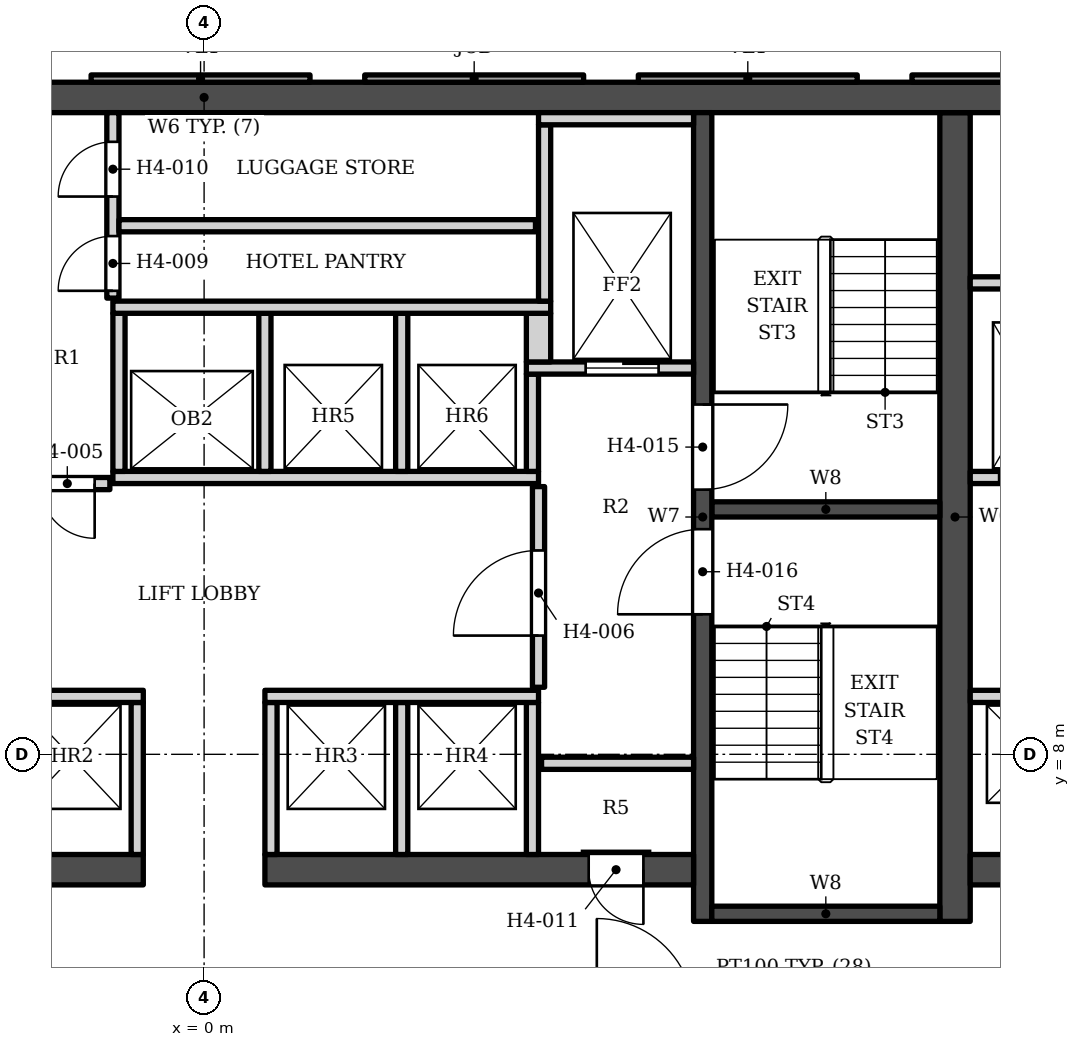
"""IFC4 building model, lengths in metres.
Left out: names, types, materials, properties, quantities, classifications, styles, units other than length and angle.
Written with IfcOpenShell. Run it as: python <this file> out.ifc"""

import sys

from ifc_helpers import new_model, si_unit, direction, frame, frame_2d, origin, place, context, subcontext, project, spatial, polyline, rectangle, outline, extrude, element, fill, save


model = new_model("IFC4")
c1 = context("Model", 3, precision=1e-05, world=origin(), true_north=direction((0.0, 1.0)))
c2 = subcontext(c1, "Body", "Model", "MODEL_VIEW")
j1 = project(units=[si_unit("LENGTHUNIT", "METRE"), si_unit("PLANEANGLEUNIT", "RADIAN")], contexts=[c1])
p1 = place(None, origin())
s1 = spatial("IfcSite", under=j1, at=p1, CompositionType="ELEMENT")
p2 = place(p1, origin())
s2 = spatial("IfcBuilding", under=s1, at=p2, CompositionType="ELEMENT")
p3 = place(p2, frame((0.0, 0.0, 76.6)))
s3 = spatial("IfcBuildingStorey", under=s2, at=p3, CompositionType="ELEMENT", Elevation=76.6)
p4 = place(p3, frame((-16.9, 18.802, 0.0), z_axis=(0.0, 0.0, 1.0), x_axis=(1.0, 0.0, 0.0)))
e1 = element("IfcWall", 1, at=p4, inside=s3, PredefinedType="SHEAR", context=c2, shape_type="SweptSolid", body=[
    extrude(rectangle(XDim=33.8, YDim=0.5, at=frame_2d((16.9, 0.0))), origin(), (0.0, 0.0, 1.0), 3.4),
])
p5 = place(p3, frame((12.35, 5.253, 0.0), z_axis=(0.0, 0.0, 1.0), x_axis=(0.0, 1.0, 0.0)))
e2 = element("IfcWall", 2, at=p5, inside=s3, PredefinedType="SHEAR", context=c2, shape_type="SweptSolid", body=[
    extrude(rectangle(XDim=13.3, YDim=0.5, at=frame_2d((6.65, 0.0))), origin(), (0.0, 0.0, 1.0), 3.4),
])
p6 = place(p3, frame((8.2, 5.253, 0.0), z_axis=(0.0, 0.0, 1.0), x_axis=(0.0, 1.0, 0.0)))
e3 = element("IfcWall", 3, at=p6, inside=s3, PredefinedType="SHEAR", context=c2, shape_type="SweptSolid", body=[
    extrude(rectangle(XDim=13.3, YDim=0.3, at=frame_2d((6.65, 0.0))), origin(), (0.0, 0.0, 1.0), 3.4),
])
p7 = place(p6, frame((7.1, 0.0, 0.0)))
e4 = element("IfcOpeningElement", 4, at=p7, cuts=e3, PredefinedType="OPENING", context=c2, shape_type="SweptSolid", body=[
    extrude(rectangle(XDim=1.4, YDim=2.1, at=frame_2d((0.7, 1.05))), frame((0.0, 0.16, 0.0), z_axis=(0.0, -1.0, 0.0), x_axis=(1.0, 0.0, 0.0)), (0.0, 0.0, 1.0), 0.32),
])
p8 = place(p6, frame((5.05, 0.0, 0.0)))
e5 = element("IfcOpeningElement", 5, at=p8, cuts=e3, PredefinedType="OPENING", context=c2, shape_type="SweptSolid", body=[
    extrude(rectangle(XDim=1.4, YDim=2.1, at=frame_2d((0.7, 1.05))), frame((0.0, 0.16, 0.0), z_axis=(0.0, -1.0, 0.0), x_axis=(1.0, 0.0, 0.0)), (0.0, 0.0, 1.0), 0.32),
])
for number, where, z_axis, x_axis in (
    (6, (8.35, 12.028, 0.0), (0.0, 0.0, 1.0), (1.0, 0.0, 0.0)),
    (7, (8.35, 5.378, 0.0), (0.0, 0.0, 1.0), (1.0, 0.0, 0.0)),
):
    element("IfcWall", number, at=place(p3, frame(where, z_axis=z_axis, x_axis=x_axis)), inside=s3, PredefinedType="SHEAR", context=c2, shape_type="SweptSolid", body=[
        extrude(rectangle(XDim=3.75, YDim=0.25, at=frame_2d((1.875, 0.0))), origin(), (0.0, 0.0, 1.0), 3.4),
    ])
p9 = place(p3, frame((-8.05, 6.103, 0.0), z_axis=(0.0, 0.0, 1.0), x_axis=(1.0, 0.0, 0.0)))
e8 = element("IfcWall", 8, at=p9, inside=s3, PredefinedType="SHEAR", context=c2, shape_type="SweptSolid", body=[
    extrude(rectangle(XDim=7.05, YDim=0.5, at=frame_2d((3.525, 0.0))), origin(), (0.0, 0.0, 1.0), 3.4),
])
p10 = place(p9, frame((0.825, 0.0, 0.0)))
e9 = element("IfcOpeningElement", 9, at=p10, cuts=e8, PredefinedType="OPENING", context=c2, shape_type="SweptSolid", body=[
    extrude(rectangle(XDim=0.9, YDim=2.1, at=frame_2d((0.45, 1.05))), frame((0.0, 0.26, 0.0), z_axis=(0.0, -1.0, 0.0), x_axis=(1.0, 0.0, 0.0)), (0.0, 0.0, 1.0), 0.52),
])
p11 = place(p3, frame((1.0, 6.103, 0.0), z_axis=(0.0, 0.0, 1.0), x_axis=(1.0, 0.0, 0.0)))
e10 = element("IfcWall", 10, at=p11, inside=s3, PredefinedType="SHEAR", context=c2, shape_type="SweptSolid", body=[
    extrude(rectangle(XDim=7.05, YDim=0.5, at=frame_2d((3.525, 0.0))), origin(), (0.0, 0.0, 1.0), 3.4),
])
p12 = place(p11, frame((5.325, 0.0, 0.0)))
e11 = element("IfcOpeningElement", 11, at=p12, cuts=e10, PredefinedType="OPENING", context=c2, shape_type="SweptSolid", body=[
    extrude(rectangle(XDim=0.9, YDim=2.1, at=frame_2d((0.45, 1.05))), frame((0.0, 0.26, 0.0), z_axis=(0.0, -1.0, 0.0), x_axis=(1.0, 0.0, 0.0)), (0.0, 0.0, 1.0), 0.52),
])
p13 = place(p3, frame((12.6, 6.103, 0.0), z_axis=(0.0, 0.0, 1.0), x_axis=(1.0, 0.0, 0.0)))
e12 = element("IfcWall", 12, at=p13, inside=s3, PredefinedType="SHEAR", context=c2, shape_type="SweptSolid", body=[
    extrude(rectangle(XDim=4.3, YDim=0.5, at=frame_2d((2.15, 0.0))), origin(), (0.0, 0.0, 1.0), 3.4),
])
p14 = place(p3, origin())
e13 = element("IfcWall", 13, at=p14, inside=s3, PredefinedType="SOLIDWALL", context=c2, shape_type="SweptSolid", body=[
    extrude(outline(polyline([(11.642, 19.173), (11.642, 19.052), (15.242, 19.052), (15.242, 19.173), (11.642, 19.173)])), origin(), (0.0, 0.0, 1.0), 2.65),
])
p15 = place(p3, origin())
e14 = element("IfcWall", 14, at=p15, inside=s3, PredefinedType="ELEMENTEDWALL", context=c2, shape_type="SweptSolid", body=[
    extrude(outline(polyline([(7.142, 19.173), (7.142, 19.052), (10.742, 19.052), (10.742, 19.173), (7.142, 19.173)])), origin(), (0.0, 0.0, 1.0), 2.65),
])
p16 = place(p3, origin())
e15 = element("IfcWall", 15, at=p16, inside=s3, PredefinedType="SOLIDWALL", context=c2, shape_type="SweptSolid", body=[
    extrude(outline(polyline([(2.642, 19.173), (2.642, 19.052), (6.242, 19.052), (6.242, 19.173), (2.642, 19.173)])), origin(), (0.0, 0.0, 1.0), 2.65),
])
p17 = place(p3, origin())
e16 = element("IfcWall", 16, at=p17, inside=s3, PredefinedType="ELEMENTEDWALL", context=c2, shape_type="SweptSolid", body=[
    extrude(outline(polyline([(-1.858, 19.173), (-1.858, 19.052), (1.742, 19.052), (1.742, 19.173), (-1.858, 19.173)])), origin(), (0.0, 0.0, 1.0), 2.65),
])
for number, where, z_axis, x_axis in (
    (17, (-1.1, 6.353, 0.0), (0.0, 0.0, 1.0), (0.0, 1.0, 0.0)),
    (18, (1.1, 6.353, 0.0), (0.0, 0.0, 1.0), (0.0, 1.0, 0.0)),
    (19, (3.25, 6.353, 0.0), (0.0, 0.0, 1.0), (0.0, 1.0, 0.0)),
    (20, (5.4, 6.353, 0.0), (0.0, 0.0, 1.0), (0.0, 1.0, 0.0)),
    (21, (5.55, 7.853, 0.0), (0.0, 0.0, 1.0), (1.0, 0.0, 0.0)),
):
    element("IfcWall", number, at=place(p3, frame(where, z_axis=z_axis, x_axis=x_axis)), inside=s3, PredefinedType="SOLIDWALL", context=c2, shape_type="SweptSolid", body=[
        extrude(rectangle(XDim=2.5, YDim=0.2, at=frame_2d((1.25, 0.0))), origin(), (0.0, 0.0, 1.0), 3.23),
    ])
for number, where, z_axis, x_axis in (
    (22, (-5.5, 8.953, 0.0), (0.0, 0.0, 1.0), (1.0, 0.0, 0.0)),
    (23, (1.0, 8.953, 0.0), (0.0, 0.0, 1.0), (1.0, 0.0, 0.0)),
):
    element("IfcWall", number, at=place(p3, frame(where, z_axis=z_axis, x_axis=x_axis)), inside=s3, PredefinedType="SOLIDWALL", context=c2, shape_type="SweptSolid", body=[
        extrude(rectangle(XDim=4.5, YDim=0.2, at=frame_2d((2.25, 0.0))), origin(), (0.0, 0.0, 1.0), 3.23),
    ])
p18 = place(p3, frame((12.6, 8.953, 0.0), z_axis=(0.0, 0.0, 1.0), x_axis=(1.0, 0.0, 0.0)))
e24 = element("IfcWall", 24, at=p18, inside=s3, PredefinedType="SOLIDWALL", context=c2, shape_type="SweptSolid", body=[
    extrude(rectangle(XDim=4.3, YDim=0.2, at=frame_2d((2.15, 0.0))), origin(), (0.0, 0.0, 1.0), 3.23),
])
p19 = place(p18, frame((0.525, 0.0, 0.0)))
e25 = element("IfcOpeningElement", 25, at=p19, cuts=e24, PredefinedType="OPENING", context=c2, shape_type="SweptSolid", body=[
    extrude(rectangle(XDim=1.1, YDim=2.1, at=frame_2d((0.55, 1.05))), frame((0.0, 0.11, 0.0), z_axis=(0.0, -1.0, 0.0), x_axis=(1.0, 0.0, 0.0)), (0.0, 0.0, 1.0), 0.22),
])
p20 = place(p18, frame((2.775, 0.0, 0.0)))
e26 = element("IfcOpeningElement", 26, at=p20, cuts=e24, PredefinedType="OPENING", context=c2, shape_type="SweptSolid", body=[
    extrude(rectangle(XDim=1.1, YDim=2.1, at=frame_2d((0.55, 1.05))), frame((0.0, 0.11, 0.0), z_axis=(0.0, -1.0, 0.0), x_axis=(1.0, 0.0, 0.0)), (0.0, 0.0, 1.0), 0.22),
])
p21 = place(p3, frame((5.5, 9.103, 0.0), z_axis=(0.0, 0.0, 1.0), x_axis=(0.0, 1.0, 0.0)))
e27 = element("IfcWall", 27, at=p21, inside=s3, PredefinedType="SOLIDWALL", context=c2, shape_type="SweptSolid", body=[
    extrude(rectangle(XDim=3.3, YDim=0.2, at=frame_2d((1.65, 0.0))), origin(), (0.0, 0.0, 1.0), 3.23),
])
p22 = place(p21, frame((0.85, 0.0, 0.0)))
e28 = element("IfcOpeningElement", 28, at=p22, cuts=e27, PredefinedType="OPENING", context=c2, shape_type="SweptSolid", body=[
    extrude(rectangle(XDim=1.4, YDim=2.1, at=frame_2d((0.7, 1.05))), frame((0.0, 0.11, 0.0), z_axis=(0.0, -1.0, 0.0), x_axis=(1.0, 0.0, 0.0)), (0.0, 0.0, 1.0), 0.22),
])
p23 = place(p3, frame((-2.95, 12.453, 0.0), z_axis=(0.0, 0.0, 1.0), x_axis=(1.0, 0.0, 0.0)))
e29 = element("IfcWall", 29, at=p23, inside=s3, PredefinedType="SOLIDWALL", context=c2, shape_type="SweptSolid", body=[
    extrude(rectangle(XDim=1.4, YDim=0.2, at=frame_2d((0.7, 0.0))), origin(), (0.0, 0.0, 1.0), 3.23),
])
p24 = place(p23, frame((0.25, 0.0, 0.0)))
e30 = element("IfcOpeningElement", 30, at=p24, cuts=e29, PredefinedType="OPENING", context=c2, shape_type="SweptSolid", body=[
    extrude(rectangle(XDim=0.9, YDim=2.1, at=frame_2d((0.45, 1.05))), frame((0.0, 0.11, 0.0), z_axis=(0.0, -1.0, 0.0), x_axis=(1.0, 0.0, 0.0)), (0.0, 0.0, 1.0), 0.22),
])
p25 = place(p3, frame((-1.5, 12.552, 0.0), z_axis=(0.0, 0.0, 1.0), x_axis=(1.0, 0.0, 0.0)))
e31 = element("IfcWall", 31, at=p25, inside=s3, PredefinedType="SOLIDWALL", context=c2, shape_type="SweptSolid", body=[
    extrude(rectangle(XDim=7.0, YDim=0.2, at=frame_2d((3.5, 0.0))), origin(), (0.0, 0.0, 1.0), 3.23),
])
p26 = place(p3, frame((12.6, 12.552, 0.0), z_axis=(0.0, 0.0, 1.0), x_axis=(1.0, 0.0, 0.0)))
e32 = element("IfcWall", 32, at=p26, inside=s3, PredefinedType="SOLIDWALL", context=c2, shape_type="SweptSolid", body=[
    extrude(rectangle(XDim=4.3, YDim=0.2, at=frame_2d((2.15, 0.0))), origin(), (0.0, 0.0, 1.0), 3.23),
])
p27 = place(p26, frame((0.475, 0.0, 0.0)))
e33 = element("IfcOpeningElement", 33, at=p27, cuts=e32, PredefinedType="OPENING", context=c2, shape_type="SweptSolid", body=[
    extrude(rectangle(XDim=1.2, YDim=2.1, at=frame_2d((0.6, 1.05))), frame((0.0, 0.11, 0.0), z_axis=(0.0, -1.0, 0.0), x_axis=(1.0, 0.0, 0.0)), (0.0, 0.0, 1.0), 0.22),
])
p28 = place(p26, frame((2.625, 0.0, 0.0)))
e34 = element("IfcOpeningElement", 34, at=p28, cuts=e32, PredefinedType="OPENING", context=c2, shape_type="SweptSolid", body=[
    extrude(rectangle(XDim=1.4, YDim=2.1, at=frame_2d((0.7, 1.05))), frame((0.0, 0.11, 0.0), z_axis=(0.0, -1.0, 0.0), x_axis=(1.0, 0.0, 0.0)), (0.0, 0.0, 1.0), 0.22),
])
for number, where, z_axis, x_axis in (
    (35, (-1.4, 12.653, 0.0), (0.0, 0.0, 1.0), (0.0, 1.0, 0.0)),
    (36, (1.0, 12.653, 0.0), (0.0, 0.0, 1.0), (0.0, 1.0, 0.0)),
    (37, (3.25, 12.653, 0.0), (0.0, 0.0, 1.0), (0.0, 1.0, 0.0)),
):
    element("IfcWall", number, at=place(p3, frame(where, z_axis=z_axis, x_axis=x_axis)), inside=s3, PredefinedType="SOLIDWALL", context=c2, shape_type="SweptSolid", body=[
        extrude(rectangle(XDim=2.6, YDim=0.2, at=frame_2d((1.3, 0.0))), origin(), (0.0, 0.0, 1.0), 3.23),
    ])
p29 = place(p3, frame((5.4, 12.653, 0.0), z_axis=(0.0, 0.0, 1.0), x_axis=(0.0, 1.0, 0.0)))
e38 = element("IfcWall", 38, at=p29, inside=s3, PredefinedType="SOLIDWALL", context=c2, shape_type="SweptSolid", body=[
    extrude(rectangle(XDim=1.6, YDim=0.2, at=frame_2d((0.8, 0.0))), origin(), (0.0, 0.0, 1.0), 3.23),
])
p30 = place(p3, frame((5.3, 14.353, 0.0), z_axis=(0.0, 0.0, 1.0), x_axis=(1.0, 0.0, 0.0)))
e39 = element("IfcWall", 39, at=p30, inside=s3, PredefinedType="SOLIDWALL", context=c2, shape_type="SweptSolid", body=[
    extrude(rectangle(XDim=2.75, YDim=0.2, at=frame_2d((1.375, 0.0))), origin(), (0.0, 0.0, 1.0), 3.23),
])
p31 = place(p30, frame((0.975, 0.0, 0.0)))
e40 = element("IfcOpeningElement", 40, at=p31, cuts=e39, PredefinedType="OPENING", context=c2, shape_type="SweptSolid", body=[
    extrude(rectangle(XDim=1.2, YDim=2.1, at=frame_2d((0.6, 1.05))), frame((0.0, 0.11, 0.0), z_axis=(0.0, -1.0, 0.0), x_axis=(1.0, 0.0, 0.0)), (0.0, 0.0, 1.0), 0.22),
])
p32 = place(p3, frame((5.5, 14.453, 0.0), z_axis=(0.0, 0.0, 1.0), x_axis=(0.0, 1.0, 0.0)))
e41 = element("IfcWall", 41, at=p32, inside=s3, PredefinedType="SOLIDWALL", context=c2, shape_type="SweptSolid", body=[
    extrude(rectangle(XDim=0.8, YDim=0.4, at=frame_2d((0.4, 0.0))), origin(), (0.0, 0.0, 1.0), 3.23),
])
p33 = place(p3, frame((-1.5, 15.353, 0.0), z_axis=(0.0, 0.0, 1.0), x_axis=(1.0, 0.0, 0.0)))
e42 = element("IfcWall", 42, at=p33, inside=s3, PredefinedType="SOLIDWALL", context=c2, shape_type="SweptSolid", body=[
    extrude(rectangle(XDim=7.2, YDim=0.2, at=frame_2d((3.6, 0.0))), origin(), (0.0, 0.0, 1.0), 3.23),
])
p34 = place(p3, frame((5.6, 15.453, 0.0), z_axis=(0.0, 0.0, 1.0), x_axis=(0.0, 1.0, 0.0)))
e43 = element("IfcWall", 43, at=p34, inside=s3, PredefinedType="SOLIDWALL", context=c2, shape_type="SweptSolid", body=[
    extrude(rectangle(XDim=2.9, YDim=0.2, at=frame_2d((1.45, 0.0))), origin(), (0.0, 0.0, 1.0), 3.23),
])
p35 = place(p3, frame((-1.5, 15.503, 0.0), z_axis=(0.0, 0.0, 1.0), x_axis=(0.0, 1.0, 0.0)))
e44 = element("IfcWall", 44, at=p35, inside=s3, PredefinedType="SOLIDWALL", context=c2, shape_type="SweptSolid", body=[
    extrude(rectangle(XDim=3.05, YDim=0.2, at=frame_2d((1.525, 0.0))), origin(), (0.0, 0.0, 1.0), 3.23),
])
p36 = place(p35, frame((0.12, 0.0, 0.0)))
e45 = element("IfcOpeningElement", 45, at=p36, cuts=e44, PredefinedType="OPENING", context=c2, shape_type="SweptSolid", body=[
    extrude(rectangle(XDim=0.9, YDim=2.1, at=frame_2d((0.45, 1.05))), frame((0.0, 0.11, 0.0), z_axis=(0.0, -1.0, 0.0), x_axis=(1.0, 0.0, 0.0)), (0.0, 0.0, 1.0), 0.22),
])
p37 = place(p35, frame((1.67, 0.0, 0.0)))
e46 = element("IfcOpeningElement", 46, at=p37, cuts=e44, PredefinedType="OPENING", context=c2, shape_type="SweptSolid", body=[
    extrude(rectangle(XDim=0.9, YDim=2.1, at=frame_2d((0.45, 1.05))), frame((0.0, 0.11, 0.0), z_axis=(0.0, -1.0, 0.0), x_axis=(1.0, 0.0, 0.0)), (0.0, 0.0, 1.0), 0.22),
])
p38 = place(p3, frame((12.6, 15.753, 0.0), z_axis=(0.0, 0.0, 1.0), x_axis=(1.0, 0.0, 0.0)))
e47 = element("IfcWall", 47, at=p38, inside=s3, PredefinedType="SOLIDWALL", context=c2, shape_type="SweptSolid", body=[
    extrude(rectangle(XDim=4.3, YDim=0.2, at=frame_2d((2.15, 0.0))), origin(), (0.0, 0.0, 1.0), 3.23),
])
p39 = place(p3, frame((-1.4, 16.693, 0.0), z_axis=(0.0, 0.0, 1.0), x_axis=(1.0, 0.0, 0.0)))
e48 = element("IfcWall", 48, at=p39, inside=s3, PredefinedType="SOLIDWALL", context=c2, shape_type="SweptSolid", body=[
    extrude(rectangle(XDim=6.85, YDim=0.2, at=frame_2d((3.425, 0.0))), origin(), (0.0, 0.0, 1.0), 3.23),
])
p40 = place(p3, frame((5.5, 18.453, 0.0), z_axis=(0.0, 0.0, 1.0), x_axis=(1.0, 0.0, 0.0)))
e49 = element("IfcWall", 49, at=p40, inside=s3, PredefinedType="SOLIDWALL", context=c2, shape_type="SweptSolid", body=[
    extrude(rectangle(XDim=2.55, YDim=0.2, at=frame_2d((1.275, 0.0))), origin(), (0.0, 0.0, 1.0), 3.23),
])
p41 = place(p31, origin())
e50 = element("IfcDoor", 50, at=p41, inside=s3, OperationType="DOUBLE_DOOR_SLIDING", PredefinedType="DOOR", context=c2, shape_type="SweptSolid", body=[
    extrude(rectangle(XDim=1.2, YDim=2.1, at=frame_2d((0.6, 1.05))), frame((0.0, 0.025, 0.0), z_axis=(0.0, -1.0, 0.0), x_axis=(1.0, 0.0, 0.0)), (0.0, 0.0, 1.0), 0.05),
])
fill(e40, e50)
p42 = place(p27, origin())
e51 = element("IfcDoor", 51, at=p42, inside=s3, OperationType="DOUBLE_DOOR_SLIDING", PredefinedType="DOOR", context=c2, shape_type="SweptSolid", body=[
    extrude(rectangle(XDim=1.2, YDim=2.1, at=frame_2d((0.6, 1.05))), frame((0.0, 0.025, 0.0), z_axis=(0.0, -1.0, 0.0), x_axis=(1.0, 0.0, 0.0)), (0.0, 0.0, 1.0), 0.05),
])
fill(e33, e51)
p43 = place(p7, origin())
e52 = element("IfcDoor", 52, at=p43, inside=s3, OperationType="SINGLE_SWING_RIGHT", PredefinedType="DOOR", context=c2, shape_type="SweptSolid", body=[
    extrude(rectangle(XDim=1.4, YDim=2.1, at=frame_2d((0.7, 1.05))), frame((0.0, 0.025, 0.0), z_axis=(0.0, -1.0, 0.0), x_axis=(1.0, 0.0, 0.0)), (0.0, 0.0, 1.0), 0.05),
])
fill(e4, e52)
p44 = place(p8, origin())
e53 = element("IfcDoor", 53, at=p44, inside=s3, OperationType="SINGLE_SWING_LEFT", PredefinedType="DOOR", context=c2, shape_type="SweptSolid", body=[
    extrude(rectangle(XDim=1.4, YDim=2.1, at=frame_2d((0.7, 1.05))), frame((0.0, 0.025, 0.0), z_axis=(0.0, -1.0, 0.0), x_axis=(1.0, 0.0, 0.0)), (0.0, 0.0, 1.0), 0.05),
])
fill(e5, e53)
p45 = place(p24, origin())
e54 = element("IfcDoor", 54, at=p45, inside=s3, OperationType="SINGLE_SWING_RIGHT", PredefinedType="DOOR", context=c2, shape_type="SweptSolid", body=[
    extrude(rectangle(XDim=0.9, YDim=2.1, at=frame_2d((0.45, 1.05))), frame((0.0, 0.025, 0.0), z_axis=(0.0, -1.0, 0.0), x_axis=(1.0, 0.0, 0.0)), (0.0, 0.0, 1.0), 0.05),
])
fill(e30, e54)
p46 = place(p22, origin())
e55 = element("IfcDoor", 55, at=p46, inside=s3, OperationType="SINGLE_SWING_LEFT", PredefinedType="DOOR", context=c2, shape_type="SweptSolid", body=[
    extrude(rectangle(XDim=1.4, YDim=2.1, at=frame_2d((0.7, 1.05))), frame((0.0, 0.025, 0.0), z_axis=(0.0, -1.0, 0.0), x_axis=(1.0, 0.0, 0.0)), (0.0, 0.0, 1.0), 0.05),
])
fill(e28, e55)
p47 = place(p36, origin())
e56 = element("IfcDoor", 56, at=p47, inside=s3, OperationType="SINGLE_SWING_LEFT", PredefinedType="DOOR", context=c2, shape_type="SweptSolid", body=[
    extrude(rectangle(XDim=0.9, YDim=2.1, at=frame_2d((0.45, 1.05))), frame((0.0, 0.025, 0.0), z_axis=(0.0, -1.0, 0.0), x_axis=(1.0, 0.0, 0.0)), (0.0, 0.0, 1.0), 0.05),
])
fill(e45, e56)
p48 = place(p37, origin())
e57 = element("IfcDoor", 57, at=p48, inside=s3, OperationType="SINGLE_SWING_LEFT", PredefinedType="DOOR", context=c2, shape_type="SweptSolid", body=[
    extrude(rectangle(XDim=0.9, YDim=2.1, at=frame_2d((0.45, 1.05))), frame((0.0, 0.025, 0.0), z_axis=(0.0, -1.0, 0.0), x_axis=(1.0, 0.0, 0.0)), (0.0, 0.0, 1.0), 0.05),
])
fill(e46, e57)
p49 = place(p12, origin())
e58 = element("IfcDoor", 58, at=p49, inside=s3, OperationType="SINGLE_SWING_RIGHT", PredefinedType="DOOR", context=c2, shape_type="SweptSolid", body=[
    extrude(rectangle(XDim=0.9, YDim=2.1, at=frame_2d((0.45, 1.05))), frame((0.0, 0.025, 0.0), z_axis=(0.0, -1.0, 0.0), x_axis=(1.0, 0.0, 0.0)), (0.0, 0.0, 1.0), 0.05),
])
fill(e11, e58)
save(model, sys.argv[1])
